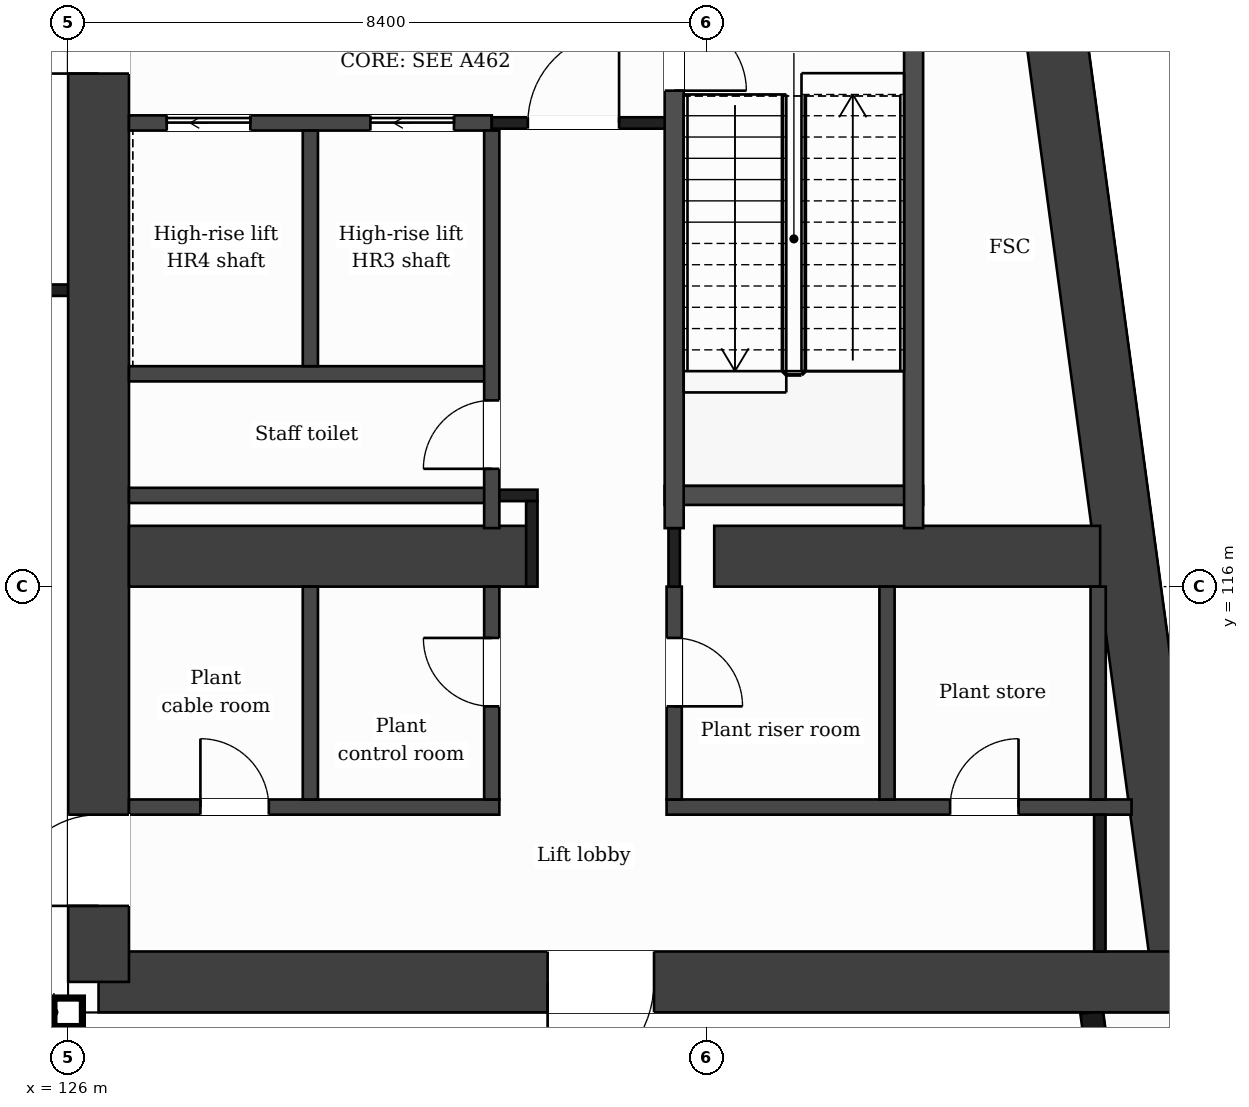
"""IFC4 building model, lengths in metres.
Left out: names, types, materials, properties, quantities, classifications, styles, units other than length and angle.
Written with IfcOpenShell. Run it as: python <this file> out.ifc"""

import sys

from ifc_helpers import new_model, si_unit, direction, frame, frame_2d, origin, place, context, subcontext, project, spatial, rectangle, extrude, element, fill, save


model = new_model("IFC4")
c1 = context("Model", 3, precision=1e-05, world=origin(), true_north=direction((0.0, 1.0)))
c2 = subcontext(c1, "Body", "Model", "MODEL_VIEW")
j1 = project(units=[si_unit("LENGTHUNIT", "METRE"), si_unit("PLANEANGLEUNIT", "RADIAN")], contexts=[c1])
p1 = place(None, origin())
s1 = spatial("IfcSite", under=j1, at=p1, CompositionType="ELEMENT")
p2 = place(p1, origin())
s2 = spatial("IfcBuilding", under=s1, at=p2, CompositionType="ELEMENT")
p3 = place(p2, frame((0.0, 0.0, 254.0)))
s3 = spatial("IfcBuildingStorey", under=s2, at=p3, CompositionType="ELEMENT", Elevation=254.0)
p4 = place(p3, frame((137.82, 132.0, 0.0), z_axis=(0.0, 0.0, 1.0), x_axis=(0.133408347329, -0.991061154956, 0.0)))
e1 = element("IfcWall", 1, at=p4, inside=s3, PredefinedType="SHEAR", context=c2, shape_type="SweptSolid", body=[
    extrude(rectangle(XDim=21.391, YDim=0.8, at=frame_2d((10.696, 0.0))), origin(), (0.0, 0.0, 1.0), 5.0),
])
p5 = place(p3, frame((140.673, 110.8, 0.0), z_axis=(0.0, 0.0, 1.0), x_axis=(-1.0, 0.0, 0.0)))
e2 = element("IfcWall", 2, at=p5, inside=s3, PredefinedType="SHEAR", context=c2, shape_type="SweptSolid", body=[
    extrude(rectangle(XDim=14.273, YDim=0.8, at=frame_2d((7.137, 0.0))), origin(), (0.0, 0.0, 1.0), 5.0),
])
p6 = place(p5, frame((6.965, 0.0, 0.0)))
e3 = element("IfcOpeningElement", 3, at=p6, cuts=e2, PredefinedType="OPENING", context=c2, shape_type="SweptSolid", body=[
    extrude(rectangle(XDim=1.4, YDim=2.1, at=frame_2d((0.7, 1.05))), frame((0.0, 0.41, 0.0), z_axis=(0.0, -1.0, 0.0), x_axis=(1.0, 0.0, 0.0)), (0.0, 0.0, 1.0), 0.82),
])
p7 = place(p3, frame((126.4, 110.8, 0.0), z_axis=(0.0, 0.0, 1.0), x_axis=(0.0, 1.0, 0.0)))
e4 = element("IfcWall", 4, at=p7, inside=s3, PredefinedType="SHEAR", context=c2, shape_type="SweptSolid", body=[
    extrude(rectangle(XDim=21.2, YDim=0.8, at=frame_2d((10.6, 0.0))), origin(), (0.0, 0.0, 1.0), 5.0),
])
p8 = place(p7, frame((1.0, 0.0, 0.0)))
e5 = element("IfcOpeningElement", 5, at=p8, cuts=e4, PredefinedType="OPENING", context=c2, shape_type="SweptSolid", body=[
    extrude(rectangle(XDim=1.2, YDim=2.1, at=frame_2d((0.6, 1.05))), frame((0.0, 0.41, 0.0), z_axis=(0.0, -1.0, 0.0), x_axis=(1.0, 0.0, 0.0)), (0.0, 0.0, 1.0), 0.82),
])
p9 = place(p7, frame((11.95, 0.0, 0.0)))
e6 = element("IfcOpeningElement", 6, at=p9, cuts=e4, PredefinedType="OPENING", context=c2, shape_type="SweptSolid", body=[
    extrude(rectangle(XDim=1.4, YDim=2.1, at=frame_2d((0.7, 1.05))), frame((0.0, 0.41, 0.0), z_axis=(0.0, -1.0, 0.0), x_axis=(1.0, 0.0, 0.0)), (0.0, 0.0, 1.0), 0.82),
])
p10 = place(p3, frame((126.8, 116.4, 0.0), z_axis=(0.0, 0.0, 1.0), x_axis=(1.0, 0.0, 0.0)))
e7 = element("IfcWall", 7, at=p10, inside=s3, PredefinedType="SHEAR", context=c2, shape_type="SweptSolid", body=[
    extrude(rectangle(XDim=5.3, YDim=0.8, at=frame_2d((2.65, 0.0))), origin(), (0.0, 0.0, 1.0), 5.0),
])
p11 = place(p3, frame((134.5, 116.4, 0.0), z_axis=(0.0, 0.0, 1.0), x_axis=(1.0, 0.0, 0.0)))
e8 = element("IfcWall", 8, at=p11, inside=s3, PredefinedType="SHEAR", context=c2, shape_type="SweptSolid", body=[
    extrude(rectangle(XDim=5.077, YDim=0.8, at=frame_2d((2.539, 0.0))), origin(), (0.0, 0.0, 1.0), 5.0),
])
p12 = place(p3, frame((140.348, 103.85, 0.0), z_axis=(0.0, 0.0, 1.0), x_axis=(-0.133431549479, 0.991058031401, 0.0)))
e9 = element("IfcWall", 9, at=p12, inside=s3, PredefinedType="SOLIDWALL", context=c2, shape_type="SweptSolid", body=[
    extrude(rectangle(XDim=6.609, YDim=0.3, at=frame_2d((3.304, 0.0))), origin(), (0.0, 0.0, 1.0), 4.68),
])
p13 = place(p12, frame((3.991, 0.0, 0.0)))
e10 = element("IfcOpeningElement", 10, at=p13, cuts=e9, PredefinedType="OPENING", context=c2, shape_type="SweptSolid", body=[
    extrude(rectangle(XDim=1.2, YDim=2.4, at=frame_2d((0.6, 1.2))), frame((0.0, 0.16, 0.0), z_axis=(0.0, -1.0, 0.0), x_axis=(1.0, 0.0, 0.0)), (0.0, 0.0, 1.0), 0.32),
])
p14 = place(p3, frame((100.7, 110.4, 0.0), z_axis=(0.0, 0.0, 1.0), x_axis=(1.0, 0.0, 0.0)))
e11 = element("IfcWall", 11, at=p14, inside=s3, PredefinedType="PARTITIONING", context=c2, shape_type="SweptSolid", body=[
    extrude(rectangle(XDim=25.4, YDim=0.2, at=frame_2d((12.7, 0.0))), origin(), (0.0, 0.0, 1.0), 4.68),
])
p15 = place(p14, frame((3.7, 0.0, 0.0)))
e12 = element("IfcOpeningElement", 12, at=p15, cuts=e11, PredefinedType="OPENING", context=c2, shape_type="SweptSolid", body=[
    extrude(rectangle(XDim=1.2, YDim=2.1, at=frame_2d((0.6, 1.05))), frame((0.0, 0.11, 0.0), z_axis=(0.0, -1.0, 0.0), x_axis=(1.0, 0.0, 0.0)), (0.0, 0.0, 1.0), 0.22),
])
p16 = place(p3, frame((126.8, 113.1, 0.0), z_axis=(0.0, 0.0, 1.0), x_axis=(1.0, 0.0, 0.0)))
e13 = element("IfcWall", 13, at=p16, inside=s3, PredefinedType="PARTITIONING", context=c2, shape_type="SweptSolid", body=[
    extrude(rectangle(XDim=4.873, YDim=0.2, at=frame_2d((2.437, 0.0))), origin(), (0.0, 0.0, 1.0), 4.68),
])
p17 = place(p16, frame((0.94, 0.0, 0.0)))
e14 = element("IfcOpeningElement", 14, at=p17, cuts=e13, PredefinedType="OPENING", context=c2, shape_type="SweptSolid", body=[
    extrude(rectangle(XDim=0.9, YDim=2.1, at=frame_2d((0.45, 1.05))), frame((0.0, 0.11, 0.0), z_axis=(0.0, -1.0, 0.0), x_axis=(1.0, 0.0, 0.0)), (0.0, 0.0, 1.0), 0.22),
])
p18 = place(p3, frame((133.873, 113.1, 0.0), z_axis=(0.0, 0.0, 1.0), x_axis=(1.0, 0.0, 0.0)))
e15 = element("IfcWall", 15, at=p18, inside=s3, PredefinedType="PARTITIONING", context=c2, shape_type="SweptSolid", body=[
    extrude(rectangle(XDim=6.117, YDim=0.2, at=frame_2d((3.059, 0.0))), origin(), (0.0, 0.0, 1.0), 4.68),
])
p19 = place(p18, frame((3.73, 0.0, 0.0)))
e16 = element("IfcOpeningElement", 16, at=p19, cuts=e15, PredefinedType="OPENING", context=c2, shape_type="SweptSolid", body=[
    extrude(rectangle(XDim=0.9, YDim=2.1, at=frame_2d((0.45, 1.05))), frame((0.0, 0.11, 0.0), z_axis=(0.0, -1.0, 0.0), x_axis=(1.0, 0.0, 0.0)), (0.0, 0.0, 1.0), 0.22),
])
p20 = place(p3, frame((126.8, 117.2, 0.0), z_axis=(0.0, 0.0, 1.0), x_axis=(1.0, 0.0, 0.0)))
e17 = element("IfcWall", 17, at=p20, inside=s3, PredefinedType="PARTITIONING", context=c2, shape_type="SweptSolid", body=[
    extrude(rectangle(XDim=4.773, YDim=0.2, at=frame_2d((2.386, 0.0))), origin(), (0.0, 0.0, 1.0), 4.68),
])
p21 = place(p3, frame((131.573, 117.2, 0.0), z_axis=(0.0, 0.0, 1.0), x_axis=(1.0, 0.0, 0.0)))
e18 = element("IfcWall", 18, at=p21, inside=s3, PredefinedType="PARTITIONING", context=c2, shape_type="SweptSolid", body=[
    extrude(rectangle(XDim=0.602, YDim=0.15, at=frame_2d((0.301, 0.0))), origin(), (0.0, 0.0, 1.0), 4.68),
])
p22 = place(p3, frame((133.848, 117.2, 0.0), z_axis=(0.0, 0.0, 1.0), x_axis=(1.0, 0.0, 0.0)))
e19 = element("IfcWall", 19, at=p22, inside=s3, PredefinedType="PARTITIONING", context=c2, shape_type="SweptSolid", body=[
    extrude(rectangle(XDim=3.4, YDim=0.25, at=frame_2d((1.7, 0.0))), origin(), (0.0, 0.0, 1.0), 4.68),
])
p23 = place(p3, frame((126.8, 118.8, 0.0), z_axis=(0.0, 0.0, 1.0), x_axis=(1.0, 0.0, 0.0)))
e20 = element("IfcWall", 20, at=p23, inside=s3, PredefinedType="PARTITIONING", context=c2, shape_type="SweptSolid", body=[
    extrude(rectangle(XDim=4.773, YDim=0.2, at=frame_2d((2.386, 0.0))), origin(), (0.0, 0.0, 1.0), 4.68),
])
p24 = place(p3, frame((100.8, 119.9, 0.0), z_axis=(0.0, 0.0, 1.0), x_axis=(1.0, 0.0, 0.0)))
e21 = element("IfcWall", 21, at=p24, inside=s3, PredefinedType="PARTITIONING", context=c2, shape_type="SweptSolid", body=[
    extrude(rectangle(XDim=25.2, YDim=0.15, at=frame_2d((12.6, 0.0))), origin(), (0.0, 0.0, 1.0), 4.68),
])
p25 = place(p24, frame((3.6, 0.0, 0.0)))
e22 = element("IfcOpeningElement", 22, at=p25, cuts=e21, PredefinedType="OPENING", context=c2, shape_type="SweptSolid", body=[
    extrude(rectangle(XDim=1.2, YDim=2.1, at=frame_2d((0.6, 1.05))), frame((0.0, 0.085, 0.0), z_axis=(0.0, -1.0, 0.0), x_axis=(1.0, 0.0, 0.0)), (0.0, 0.0, 1.0), 0.17),
])
p26 = place(p24, frame((12.0, 0.0, 0.0)))
e23 = element("IfcOpeningElement", 23, at=p26, cuts=e21, PredefinedType="OPENING", context=c2, shape_type="SweptSolid", body=[
    extrude(rectangle(XDim=1.2, YDim=2.1, at=frame_2d((0.6, 1.05))), frame((0.0, 0.085, 0.0), z_axis=(0.0, -1.0, 0.0), x_axis=(1.0, 0.0, 0.0)), (0.0, 0.0, 1.0), 0.17),
])
p27 = place(p24, frame((20.4, 0.0, 0.0)))
e24 = element("IfcOpeningElement", 24, at=p27, cuts=e21, PredefinedType="OPENING", context=c2, shape_type="SweptSolid", body=[
    extrude(rectangle(XDim=1.2, YDim=2.1, at=frame_2d((0.6, 1.05))), frame((0.0, 0.085, 0.0), z_axis=(0.0, -1.0, 0.0), x_axis=(1.0, 0.0, 0.0)), (0.0, 0.0, 1.0), 0.17),
])
p28 = place(p3, frame((126.8, 122.1, 0.0), z_axis=(0.0, 0.0, 1.0), x_axis=(1.0, 0.0, 0.0)))
e25 = element("IfcWall", 25, at=p28, inside=s3, PredefinedType="PARTITIONING", context=c2, shape_type="SweptSolid", body=[
    extrude(rectangle(XDim=4.773, YDim=0.2, at=frame_2d((2.386, 0.0))), origin(), (0.0, 0.0, 1.0), 4.68),
])
p29 = place(p28, frame((3.176, 0.0, 0.0)))
e26 = element("IfcOpeningElement", 26, at=p29, cuts=e25, PredefinedType="OPENING", context=c2, shape_type="SweptSolid", body=[
    extrude(rectangle(XDim=1.1, YDim=2.1, at=frame_2d((0.55, 1.05))), frame((0.0, 0.11, 0.0), z_axis=(0.0, -1.0, 0.0), x_axis=(1.0, 0.0, 0.0)), (0.0, 0.0, 1.0), 0.22),
])
p30 = place(p28, frame((0.497, 0.0, 0.0)))
e27 = element("IfcOpeningElement", 27, at=p30, cuts=e25, PredefinedType="OPENING", context=c2, shape_type="SweptSolid", body=[
    extrude(rectangle(XDim=1.1, YDim=2.1, at=frame_2d((0.55, 1.05))), frame((0.0, 0.11, 0.0), z_axis=(0.0, -1.0, 0.0), x_axis=(1.0, 0.0, 0.0)), (0.0, 0.0, 1.0), 0.22),
])
p31 = place(p3, frame((131.573, 122.1, 0.0), z_axis=(0.0, 0.0, 1.0), x_axis=(1.0, 0.0, 0.0)))
e28 = element("IfcWall", 28, at=p31, inside=s3, PredefinedType="PARTITIONING", context=c2, shape_type="SweptSolid", body=[
    extrude(rectangle(XDim=2.4, YDim=0.15, at=frame_2d((1.2, 0.0))), origin(), (0.0, 0.0, 1.0), 4.68),
])
p32 = place(p31, frame((0.475, 0.0, 0.0)))
e29 = element("IfcOpeningElement", 29, at=p32, cuts=e28, PredefinedType="OPENING", context=c2, shape_type="SweptSolid", body=[
    extrude(rectangle(XDim=1.2, YDim=2.1, at=frame_2d((0.6, 1.05))), frame((0.0, 0.085, 0.0), z_axis=(0.0, -1.0, 0.0), x_axis=(1.0, 0.0, 0.0)), (0.0, 0.0, 1.0), 0.17),
])
p33 = place(p3, frame((126.0, 99.79, 0.0), z_axis=(0.0, 0.0, 1.0), x_axis=(0.0, 1.0, 0.0)))
e30 = element("IfcWall", 30, at=p33, inside=s3, PredefinedType="PARTITIONING", context=c2, shape_type="SweptSolid", body=[
    extrude(rectangle(XDim=10.51, YDim=0.2, at=frame_2d((5.255, 0.0))), origin(), (0.0, 0.0, 1.0), 4.68),
])
p34 = place(p3, frame((129.187, 113.2, 0.0), z_axis=(0.0, 0.0, 1.0), x_axis=(0.0, 1.0, 0.0)))
e31 = element("IfcWall", 31, at=p34, inside=s3, PredefinedType="PARTITIONING", context=c2, shape_type="SweptSolid", body=[
    extrude(rectangle(XDim=2.8, YDim=0.2, at=frame_2d((1.4, 0.0))), origin(), (0.0, 0.0, 1.0), 4.68),
])
p35 = place(p3, frame((129.187, 118.9, 0.0), z_axis=(0.0, 0.0, 1.0), x_axis=(0.0, 1.0, 0.0)))
e32 = element("IfcWall", 32, at=p35, inside=s3, PredefinedType="PARTITIONING", context=c2, shape_type="SweptSolid", body=[
    extrude(rectangle(XDim=3.1, YDim=0.2, at=frame_2d((1.55, 0.0))), origin(), (0.0, 0.0, 1.0), 4.68),
])
p36 = place(p3, frame((131.573, 113.2, 0.0), z_axis=(0.0, 0.0, 1.0), x_axis=(0.0, 1.0, 0.0)))
e33 = element("IfcWall", 33, at=p36, inside=s3, PredefinedType="PARTITIONING", context=c2, shape_type="SweptSolid", body=[
    extrude(rectangle(XDim=2.8, YDim=0.2, at=frame_2d((1.4, 0.0))), origin(), (0.0, 0.0, 1.0), 4.68),
])
p37 = place(p36, frame((1.225, 0.0, 0.0)))
e34 = element("IfcOpeningElement", 34, at=p37, cuts=e33, PredefinedType="OPENING", context=c2, shape_type="SweptSolid", body=[
    extrude(rectangle(XDim=0.9, YDim=2.1, at=frame_2d((0.45, 1.05))), frame((0.0, 0.11, 0.0), z_axis=(0.0, -1.0, 0.0), x_axis=(1.0, 0.0, 0.0)), (0.0, 0.0, 1.0), 0.22),
])
p38 = place(p3, frame((131.573, 116.77, 0.0), z_axis=(0.0, 0.0, 1.0), x_axis=(0.0, 1.0, 0.0)))
e35 = element("IfcWall", 35, at=p38, inside=s3, PredefinedType="PARTITIONING", context=c2, shape_type="SweptSolid", body=[
    extrude(rectangle(XDim=5.23, YDim=0.2, at=frame_2d((2.615, 0.0))), origin(), (0.0, 0.0, 1.0), 4.68),
])
p39 = place(p38, frame((0.78, 0.0, 0.0)))
e36 = element("IfcOpeningElement", 36, at=p39, cuts=e35, PredefinedType="OPENING", context=c2, shape_type="SweptSolid", body=[
    extrude(rectangle(XDim=0.9, YDim=2.1, at=frame_2d((0.45, 1.05))), frame((0.0, 0.11, 0.0), z_axis=(0.0, -1.0, 0.0), x_axis=(1.0, 0.0, 0.0)), (0.0, 0.0, 1.0), 0.22),
])
p40 = place(p3, frame((132.1, 116.0, 0.0), z_axis=(0.0, 0.0, 1.0), x_axis=(0.0, 1.0, 0.0)))
e37 = element("IfcWall", 37, at=p40, inside=s3, PredefinedType="PARTITIONING", context=c2, shape_type="SweptSolid", body=[
    extrude(rectangle(XDim=1.125, YDim=0.15, at=frame_2d((0.562, 0.0))), origin(), (0.0, 0.0, 1.0), 4.68),
])
p41 = place(p3, frame((133.973, 113.2, 0.0), z_axis=(0.0, 0.0, 1.0), x_axis=(0.0, 1.0, 0.0)))
e38 = element("IfcWall", 38, at=p41, inside=s3, PredefinedType="PARTITIONING", context=c2, shape_type="SweptSolid", body=[
    extrude(rectangle(XDim=2.8, YDim=0.2, at=frame_2d((1.4, 0.0))), origin(), (0.0, 0.0, 1.0), 4.68),
])
p42 = place(p41, frame((1.225, 0.0, 0.0)))
e39 = element("IfcOpeningElement", 39, at=p42, cuts=e38, PredefinedType="OPENING", context=c2, shape_type="SweptSolid", body=[
    extrude(rectangle(XDim=0.9, YDim=2.1, at=frame_2d((0.45, 1.05))), frame((0.0, 0.11, 0.0), z_axis=(0.0, -1.0, 0.0), x_axis=(1.0, 0.0, 0.0)), (0.0, 0.0, 1.0), 0.22),
])
p43 = place(p3, frame((133.973, 116.0, 0.0), z_axis=(0.0, 0.0, 1.0), x_axis=(0.0, 1.0, 0.0)))
e40 = element("IfcWall", 40, at=p43, inside=s3, PredefinedType="PARTITIONING", context=c2, shape_type="SweptSolid", body=[
    extrude(rectangle(XDim=0.77, YDim=0.15, at=frame_2d((0.385, 0.0))), origin(), (0.0, 0.0, 1.0), 4.68),
])
p44 = place(p3, frame((133.973, 116.77, 0.0), z_axis=(0.0, 0.0, 1.0), x_axis=(0.0, 1.0, 0.0)))
e41 = element("IfcWall", 41, at=p44, inside=s3, PredefinedType="PARTITIONING", context=c2, shape_type="SweptSolid", body=[
    extrude(rectangle(XDim=7.055, YDim=0.25, at=frame_2d((3.527, 0.0))), origin(), (0.0, 0.0, 1.0), 4.68),
])
p45 = place(p44, frame((5.755, 0.0, 0.0)))
e42 = element("IfcOpeningElement", 42, at=p45, cuts=e41, PredefinedType="OPENING", context=c2, shape_type="SweptSolid", body=[
    extrude(rectangle(XDim=0.95, YDim=2.1, at=frame_2d((0.475, 1.05))), frame((0.0, 0.135, 0.0), z_axis=(0.0, -1.0, 0.0), x_axis=(1.0, 0.0, 0.0)), (0.0, 0.0, 1.0), 0.27),
])
p46 = place(p3, frame((136.773, 113.2, 0.0), z_axis=(0.0, 0.0, 1.0), x_axis=(0.0, 1.0, 0.0)))
e43 = element("IfcWall", 43, at=p46, inside=s3, PredefinedType="PARTITIONING", context=c2, shape_type="SweptSolid", body=[
    extrude(rectangle(XDim=2.8, YDim=0.2, at=frame_2d((1.4, 0.0))), origin(), (0.0, 0.0, 1.0), 4.68),
])
p47 = place(p3, frame((137.123, 116.77, 0.0), z_axis=(0.0, 0.0, 1.0), x_axis=(0.0, 1.0, 0.0)))
e44 = element("IfcWall", 44, at=p47, inside=s3, PredefinedType="PARTITIONING", context=c2, shape_type="SweptSolid", body=[
    extrude(rectangle(XDim=7.055, YDim=0.25, at=frame_2d((3.527, 0.0))), origin(), (0.0, 0.0, 1.0), 4.68),
])
p48 = place(p3, frame((139.551, 113.2, 0.0), z_axis=(0.0, 0.0, 1.0), x_axis=(0.0, 1.0, 0.0)))
e45 = element("IfcWall", 45, at=p48, inside=s3, PredefinedType="PARTITIONING", context=c2, shape_type="SweptSolid", body=[
    extrude(rectangle(XDim=2.8, YDim=0.2, at=frame_2d((1.4, 0.0))), origin(), (0.0, 0.0, 1.0), 4.68),
])
p49 = place(p3, frame((139.573, 111.2, 0.0), z_axis=(0.0, 0.0, 1.0), x_axis=(0.0, 1.0, 0.0)))
e46 = element("IfcWall", 46, at=p49, inside=s3, PredefinedType="PARTITIONING", context=c2, shape_type="SweptSolid", body=[
    extrude(rectangle(XDim=1.8, YDim=0.15, at=frame_2d((0.9, 0.0))), origin(), (0.0, 0.0, 1.0), 4.68),
])
p50 = place(p32, origin())
e47 = element("IfcDoor", 47, at=p50, inside=s3, OperationType="SINGLE_SWING_RIGHT", PredefinedType="DOOR", context=c2, shape_type="SweptSolid", body=[
    extrude(rectangle(XDim=1.2, YDim=2.1, at=frame_2d((0.6, 1.05))), frame((0.0, 0.025, 0.0), z_axis=(0.0, -1.0, 0.0), x_axis=(1.0, 0.0, 0.0)), (0.0, 0.0, 1.0), 0.05),
])
fill(e29, e47)
p51 = place(p29, origin())
e48 = element("IfcDoor", 48, at=p51, inside=s3, OperationType="SLIDING_TO_LEFT", PredefinedType="DOOR", context=c2, shape_type="SweptSolid", body=[
    extrude(rectangle(XDim=1.1, YDim=2.1, at=frame_2d((0.55, 1.05))), frame((0.0, 0.025, 0.0), z_axis=(0.0, -1.0, 0.0), x_axis=(1.0, 0.0, 0.0)), (0.0, 0.0, 1.0), 0.05),
])
fill(e26, e48)
p52 = place(p30, origin())
e49 = element("IfcDoor", 49, at=p52, inside=s3, OperationType="SLIDING_TO_LEFT", PredefinedType="DOOR", context=c2, shape_type="SweptSolid", body=[
    extrude(rectangle(XDim=1.1, YDim=2.1, at=frame_2d((0.55, 1.05))), frame((0.0, 0.025, 0.0), z_axis=(0.0, -1.0, 0.0), x_axis=(1.0, 0.0, 0.0)), (0.0, 0.0, 1.0), 0.05),
])
fill(e27, e49)
p53 = place(p45, origin())
e50 = element("IfcDoor", 50, at=p53, inside=s3, OperationType="SINGLE_SWING_LEFT", PredefinedType="DOOR", context=c2, shape_type="SweptSolid", body=[
    extrude(rectangle(XDim=0.95, YDim=2.1, at=frame_2d((0.475, 1.05))), frame((0.0, 0.025, 0.0), z_axis=(0.0, -1.0, 0.0), x_axis=(1.0, 0.0, 0.0)), (0.0, 0.0, 1.0), 0.05),
])
fill(e42, e50)
p54 = place(p39, origin())
e51 = element("IfcDoor", 51, at=p54, inside=s3, OperationType="SINGLE_SWING_LEFT", PredefinedType="DOOR", context=c2, shape_type="SweptSolid", body=[
    extrude(rectangle(XDim=0.9, YDim=2.1, at=frame_2d((0.45, 1.05))), frame((0.0, 0.025, 0.0), z_axis=(0.0, -1.0, 0.0), x_axis=(1.0, 0.0, 0.0)), (0.0, 0.0, 1.0), 0.05),
])
fill(e36, e51)
p55 = place(p19, origin())
e52 = element("IfcDoor", 52, at=p55, inside=s3, OperationType="SINGLE_SWING_RIGHT", PredefinedType="DOOR", context=c2, shape_type="SweptSolid", body=[
    extrude(rectangle(XDim=0.9, YDim=2.1, at=frame_2d((0.45, 1.05))), frame((0.0, 0.025, 0.0), z_axis=(0.0, -1.0, 0.0), x_axis=(1.0, 0.0, 0.0)), (0.0, 0.0, 1.0), 0.05),
])
fill(e16, e52)
p56 = place(p42, origin())
e53 = element("IfcDoor", 53, at=p56, inside=s3, OperationType="SINGLE_SWING_LEFT", PredefinedType="DOOR", context=c2, shape_type="SweptSolid", body=[
    extrude(rectangle(XDim=0.9, YDim=2.1, at=frame_2d((0.45, 1.05))), frame((0.0, 0.025, 0.0), z_axis=(0.0, -1.0, 0.0), x_axis=(1.0, 0.0, 0.0)), (0.0, 0.0, 1.0), 0.05),
])
fill(e39, e53)
p57 = place(p37, origin())
e54 = element("IfcDoor", 54, at=p57, inside=s3, OperationType="SINGLE_SWING_RIGHT", PredefinedType="DOOR", context=c2, shape_type="SweptSolid", body=[
    extrude(rectangle(XDim=0.9, YDim=2.1, at=frame_2d((0.45, 1.05))), frame((0.0, 0.025, 0.0), z_axis=(0.0, -1.0, 0.0), x_axis=(1.0, 0.0, 0.0)), (0.0, 0.0, 1.0), 0.05),
])
fill(e34, e54)
p58 = place(p17, origin())
e55 = element("IfcDoor", 55, at=p58, inside=s3, OperationType="SINGLE_SWING_LEFT", PredefinedType="DOOR", context=c2, shape_type="SweptSolid", body=[
    extrude(rectangle(XDim=0.9, YDim=2.1, at=frame_2d((0.45, 1.05))), frame((0.0, 0.025, 0.0), z_axis=(0.0, -1.0, 0.0), x_axis=(1.0, 0.0, 0.0)), (0.0, 0.0, 1.0), 0.05),
])
fill(e14, e55)
p59 = place(p6, origin())
e56 = element("IfcDoor", 56, at=p59, inside=s3, OperationType="SINGLE_SWING_RIGHT", PredefinedType="DOOR", context=c2, shape_type="SweptSolid", body=[
    extrude(rectangle(XDim=1.4, YDim=2.1, at=frame_2d((0.7, 1.05))), frame((0.0, 0.025, 0.0), z_axis=(0.0, -1.0, 0.0), x_axis=(1.0, 0.0, 0.0)), (0.0, 0.0, 1.0), 0.05),
])
fill(e3, e56)
p60 = place(p8, origin())
e57 = element("IfcDoor", 57, at=p60, inside=s3, OperationType="SINGLE_SWING_LEFT", PredefinedType="DOOR", context=c2, shape_type="SweptSolid", body=[
    extrude(rectangle(XDim=1.2, YDim=2.1, at=frame_2d((0.6, 1.05))), frame((0.0, 0.025, 0.0), z_axis=(0.0, -1.0, 0.0), x_axis=(1.0, 0.0, 0.0)), (0.0, 0.0, 1.0), 0.05),
])
fill(e5, e57)
p61 = place(p9, origin())
e58 = element("IfcDoor", 58, at=p61, inside=s3, OperationType="SINGLE_SWING_LEFT", PredefinedType="DOOR", context=c2, shape_type="SweptSolid", body=[
    extrude(rectangle(XDim=1.4, YDim=2.1, at=frame_2d((0.7, 1.05))), frame((0.0, 0.025, 0.0), z_axis=(0.0, -1.0, 0.0), x_axis=(1.0, 0.0, 0.0)), (0.0, 0.0, 1.0), 0.05),
])
fill(e6, e58)
save(model, sys.argv[1])
